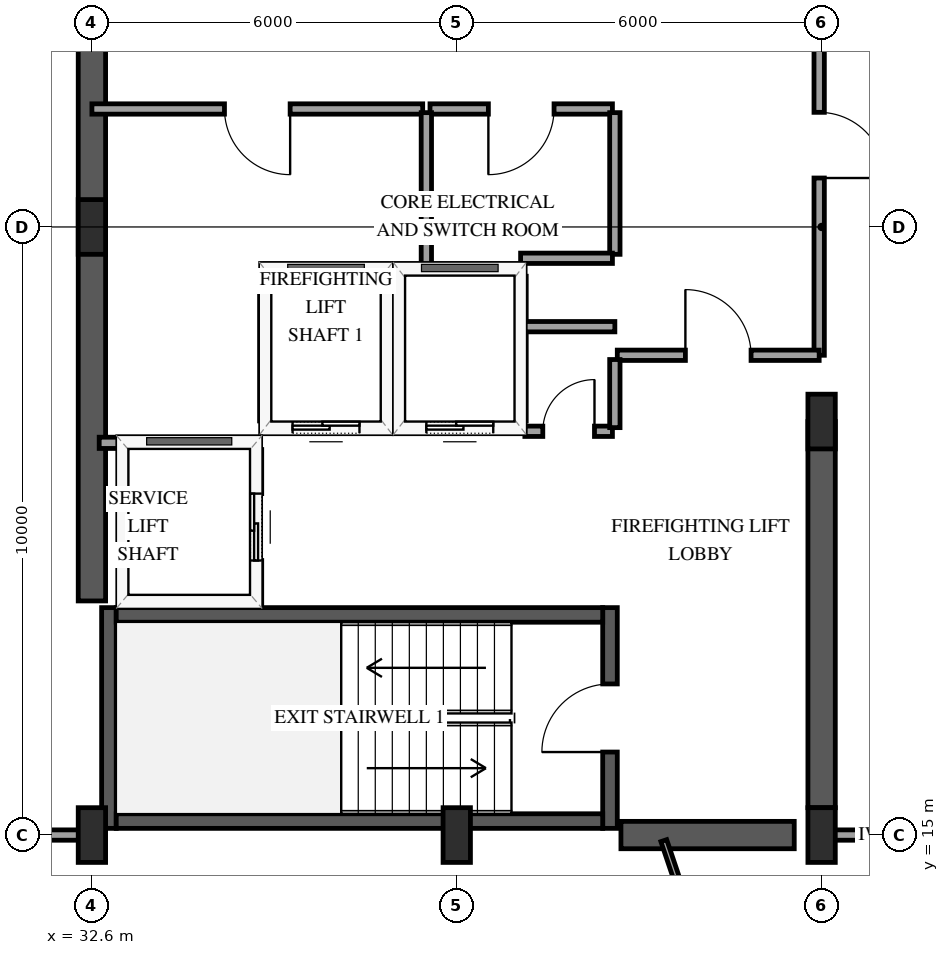
"""IFC4 building model, lengths in metres.
Left out: names, types, materials, properties, quantities, classifications, styles, units other than length and angle.
Written with IfcOpenShell. Run it as: python <this file> out.ifc"""

import sys

from ifc_helpers import new_model, si_unit, direction, frame, frame_2d, origin, origin_2d, place, context, subcontext, project, spatial, rectangle, extrude, element, fill, save


model = new_model("IFC4")
c1 = context("Model", 3, precision=1e-05, world=origin(), true_north=direction((0.0, 1.0)))
c2 = subcontext(c1, "Body", "Model", "MODEL_VIEW")
j1 = project(units=[si_unit("LENGTHUNIT", "METRE"), si_unit("PLANEANGLEUNIT", "RADIAN")], contexts=[c1])
p1 = place(None, origin())
s1 = spatial("IfcSite", under=j1, at=p1, CompositionType="ELEMENT")
p2 = place(p1, origin())
s2 = spatial("IfcBuilding", under=s1, at=p2, CompositionType="ELEMENT")
p3 = place(p2, frame((0.0, 0.0, 280.0)))
s3 = spatial("IfcBuildingStorey", under=s2, at=p3, CompositionType="ELEMENT", Elevation=280.0)
p4 = place(p3, frame((32.88, 15.11, 0.0), z_axis=(0.0, 0.0, 1.0), x_axis=(0.0, 1.0, 0.0)))
e1 = element("IfcWall", 1, at=p4, inside=s3, PredefinedType="SHEAR", context=c2, shape_type="SweptSolid", body=[
    extrude(rectangle(XDim=3.63, YDim=0.24, at=frame_2d((1.815, 0.0))), origin(), (0.0, 0.0, 1.0), 3.75),
])
p5 = place(p3, frame((41.12, 15.11, 0.0), z_axis=(0.0, 0.0, 1.0), x_axis=(0.0, 1.0, 0.0)))
e2 = element("IfcWall", 2, at=p5, inside=s3, PredefinedType="SHEAR", context=c2, shape_type="SweptSolid", body=[
    extrude(rectangle(XDim=3.63, YDim=0.24, at=frame_2d((1.815, 0.0))), origin(), (0.0, 0.0, 1.0), 3.75),
])
p6 = place(p5, frame((1.255, 0.0, 0.0)))
e3 = element("IfcOpeningElement", 3, at=p6, cuts=e2, PredefinedType="OPENING", context=c2, shape_type="SweptSolid", body=[
    extrude(rectangle(XDim=1.12, YDim=2.15, at=frame_2d((0.56, 1.075))), frame((0.0, 0.13, 0.0), z_axis=(0.0, -1.0, 0.0), x_axis=(1.0, 0.0, 0.0)), (0.0, 0.0, 1.0), 0.26),
])
for number, where, z_axis, x_axis in (
    (4, (33.0, 15.23, 0.0), (0.0, 0.0, 1.0), (1.0, 0.0, 0.0)),
    (5, (33.0, 18.62, 0.0), (0.0, 0.0, 1.0), (1.0, 0.0, 0.0)),
):
    element("IfcWall", number, at=place(p3, frame(where, z_axis=z_axis, x_axis=x_axis)), inside=s3, PredefinedType="SHEAR", context=c2, shape_type="SweptSolid", body=[
        extrude(rectangle(XDim=8.0, YDim=0.24, at=frame_2d((4.0, 0.0))), origin(), (0.0, 0.0, 1.0), 3.75),
    ])
p7 = place(p3, frame((32.6, 18.85, 0.0), z_axis=(0.0, 0.0, 1.0), x_axis=(0.0, 1.0, 0.0)))
e6 = element("IfcWall", 6, at=p7, inside=s3, PredefinedType="SHEAR", context=c2, shape_type="SweptSolid", body=[
    extrude(rectangle(XDim=12.3, YDim=0.45, at=frame_2d((6.15, 0.0))), origin(), (0.0, 0.0, 1.0), 3.75),
])
p8 = place(p3, frame((41.3, 15.0, 0.0), z_axis=(0.0, 0.0, 1.0), x_axis=(1.0, 0.0, 0.0)))
e7 = element("IfcWall", 7, at=p8, inside=s3, PredefinedType="SHEAR", context=c2, shape_type="SweptSolid", body=[
    extrude(rectangle(XDim=2.85, YDim=0.45, at=frame_2d((1.425, 0.0))), origin(), (0.0, 0.0, 1.0), 3.75),
])
p9 = place(p3, frame((44.6, 15.45, 0.0), z_axis=(0.0, 0.0, 1.0), x_axis=(0.0, 1.0, 0.0)))
e8 = element("IfcWall", 8, at=p9, inside=s3, PredefinedType="SHEAR", context=c2, shape_type="SweptSolid", body=[
    extrude(rectangle(XDim=6.35, YDim=0.45, at=frame_2d((3.175, 0.0))), origin(), (0.0, 0.0, 1.0), 3.75),
])
for number, where, z_axis, x_axis in (
    (9, (32.6, 15.0, 0.0), (0.0, 0.0, 1.0), (1.0, 0.0, 0.0)),
    (10, (32.6, 25.0, 0.0), (0.0, 0.0, 1.0), (1.0, 0.0, 0.0)),
    (11, (38.6, 15.0, 0.0), (0.0, 0.0, 1.0), (1.0, 0.0, 0.0)),
    (12, (44.6, 15.0, 0.0), (0.0, 0.0, 1.0), (1.0, 0.0, 0.0)),
    (13, (44.6, 21.8, 0.0), (0.0, 0.0, 1.0), (1.0, 0.0, 0.0)),
):
    element("IfcColumn", number, at=place(p3, frame(where, z_axis=z_axis, x_axis=x_axis)), inside=s3, PredefinedType="PILASTER", context=c2, shape_type="SweptSolid", body=[
        extrude(rectangle(XDim=0.45, YDim=0.9, at=origin_2d()), origin(), (0.0, 0.0, 1.0), 3.75),
    ])
p10 = place(p3, frame((35.45, 21.7, 0.0), z_axis=(0.0, 0.0, 1.0), x_axis=(1.0, 0.0, 0.0)))
e14 = element("IfcWall", 14, at=p10, inside=s3, PredefinedType="SOLIDWALL", context=c2, shape_type="SweptSolid", body=[
    extrude(rectangle(XDim=2.0, YDim=0.185, at=frame_2d((1.0, 0.0))), origin(), (0.0, 0.0, 1.0), 3.41),
])
p11 = place(p10, frame((0.45, 0.0, 0.0)))
e15 = element("IfcOpeningElement", 15, at=p11, cuts=e14, PredefinedType="OPENING", context=c2, shape_type="SweptSolid", body=[
    extrude(rectangle(XDim=1.1, YDim=2.15, at=frame_2d((0.55, 1.075))), frame((0.0, 0.103, 0.0), z_axis=(0.0, -1.0, 0.0), x_axis=(1.0, 0.0, 0.0)), (0.0, 0.0, 1.0), 0.205),
])
p12 = place(p3, frame((35.45, 24.3, 0.0), z_axis=(0.0, 0.0, 1.0), x_axis=(1.0, 0.0, 0.0)))
e16 = element("IfcWall", 16, at=p12, inside=s3, PredefinedType="SOLIDWALL", context=c2, shape_type="SweptSolid", body=[
    extrude(rectangle(XDim=2.0, YDim=0.185, at=frame_2d((1.0, 0.0))), origin(), (0.0, 0.0, 1.0), 3.41),
])
for number, where, z_axis, x_axis in (
    (17, (35.45, 21.81, 0.0), (0.0, 0.0, 1.0), (0.0, 1.0, 0.0)),
    (18, (37.45, 21.81, 0.0), (0.0, 0.0, 1.0), (0.0, 1.0, 0.0)),
):
    element("IfcWall", number, at=place(p3, frame(where, z_axis=z_axis, x_axis=x_axis)), inside=s3, PredefinedType="SOLIDWALL", context=c2, shape_type="SweptSolid", body=[
        extrude(rectangle(XDim=2.38, YDim=0.185, at=frame_2d((1.19, 0.0))), origin(), (0.0, 0.0, 1.0), 3.41),
    ])
p13 = place(p3, frame((37.65, 21.7, 0.0), z_axis=(0.0, 0.0, 1.0), x_axis=(1.0, 0.0, 0.0)))
e19 = element("IfcWall", 19, at=p13, inside=s3, PredefinedType="SOLIDWALL", context=c2, shape_type="SweptSolid", body=[
    extrude(rectangle(XDim=2.0, YDim=0.185, at=frame_2d((1.0, 0.0))), origin(), (0.0, 0.0, 1.0), 3.41),
])
p14 = place(p13, frame((0.45, 0.0, 0.0)))
e20 = element("IfcOpeningElement", 20, at=p14, cuts=e19, PredefinedType="OPENING", context=c2, shape_type="SweptSolid", body=[
    extrude(rectangle(XDim=1.1, YDim=2.15, at=frame_2d((0.55, 1.075))), frame((0.0, 0.103, 0.0), z_axis=(0.0, -1.0, 0.0), x_axis=(1.0, 0.0, 0.0)), (0.0, 0.0, 1.0), 0.205),
])
p15 = place(p3, frame((37.65, 24.3, 0.0), z_axis=(0.0, 0.0, 1.0), x_axis=(1.0, 0.0, 0.0)))
e21 = element("IfcWall", 21, at=p15, inside=s3, PredefinedType="SOLIDWALL", context=c2, shape_type="SweptSolid", body=[
    extrude(rectangle(XDim=2.0, YDim=0.185, at=frame_2d((1.0, 0.0))), origin(), (0.0, 0.0, 1.0), 3.41),
])
p16 = place(p3, frame((39.65, 21.81, 0.0), z_axis=(0.0, 0.0, 1.0), x_axis=(0.0, 1.0, 0.0)))
e22 = element("IfcWall", 22, at=p16, inside=s3, PredefinedType="SOLIDWALL", context=c2, shape_type="SweptSolid", body=[
    extrude(rectangle(XDim=2.38, YDim=0.185, at=frame_2d((1.19, 0.0))), origin(), (0.0, 0.0, 1.0), 3.41),
])
p17 = place(p3, frame((32.72, 21.45, 0.0), z_axis=(0.0, 0.0, 1.0), x_axis=(1.0, 0.0, 0.0)))
e23 = element("IfcWall", 23, at=p17, inside=s3, PredefinedType="SOLIDWALL", context=c2, shape_type="SweptSolid", body=[
    extrude(rectangle(XDim=2.58, YDim=0.185, at=frame_2d((1.29, 0.0))), origin(), (0.0, 0.0, 1.0), 3.41),
])
p18 = place(p3, frame((35.3, 18.79, 0.0), z_axis=(0.0, 0.0, 1.0), x_axis=(0.0, 1.0, 0.0)))
e24 = element("IfcWall", 24, at=p18, inside=s3, PredefinedType="SOLIDWALL", context=c2, shape_type="SweptSolid", body=[
    extrude(rectangle(XDim=2.55, YDim=0.185, at=frame_2d((1.275, 0.0))), origin(), (0.0, 0.0, 1.0), 3.41),
])
p19 = place(p18, frame((0.725, 0.0, 0.0)))
e25 = element("IfcOpeningElement", 25, at=p19, cuts=e24, PredefinedType="OPENING", context=c2, shape_type="SweptSolid", body=[
    extrude(rectangle(XDim=1.1, YDim=2.15, at=frame_2d((0.55, 1.075))), frame((0.0, 0.103, 0.0), z_axis=(0.0, -1.0, 0.0), x_axis=(1.0, 0.0, 0.0)), (0.0, 0.0, 1.0), 0.205),
])
p20 = place(p3, frame((42.005, 14.908, 0.0), z_axis=(0.0, 0.0, 1.0), x_axis=(0.31974079099, -0.947505053589, 0.0)))
e26 = element("IfcWall", 26, at=p20, inside=s3, PredefinedType="PARTITIONING", context=c2, shape_type="SweptSolid", body=[
    extrude(rectangle(XDim=8.251, YDim=0.1, at=frame_2d((4.125, 0.0))), origin(), (0.0, 0.0, 1.0), 2.705),
])
p21 = place(p3, frame((44.56, 29.8, 0.0), z_axis=(0.0, 0.0, 1.0), x_axis=(0.0, -1.0, 0.0)))
e27 = element("IfcWall", 27, at=p21, inside=s3, PredefinedType="PARTITIONING", context=c2, shape_type="SweptSolid", body=[
    extrude(rectangle(XDim=6.91, YDim=0.17, at=frame_2d((3.455, 0.0))), origin(), (0.0, 0.0, 1.0), 2.45),
])
p22 = place(p21, frame((2.915, 0.0, 0.0)))
e28 = element("IfcOpeningElement", 28, at=p22, cuts=e27, PredefinedType="OPENING", context=c2, shape_type="SweptSolid", body=[
    extrude(rectangle(XDim=1.08, YDim=2.15, at=frame_2d((0.54, 1.075))), frame((0.0, 0.095, 0.0), z_axis=(0.0, -1.0, 0.0), x_axis=(1.0, 0.0, 0.0)), (0.0, 0.0, 1.0), 0.19),
])
p23 = place(p3, frame((38.04, 26.94, 0.0), z_axis=(0.0, 0.0, 1.0), x_axis=(-1.0, 0.0, 0.0)))
e29 = element("IfcWall", 29, at=p23, inside=s3, PredefinedType="PARTITIONING", context=c2, shape_type="SweptSolid", body=[
    extrude(rectangle(XDim=5.44, YDim=0.17, at=frame_2d((2.72, 0.0))), origin(), (0.0, 0.0, 1.0), 3.41),
])
p24 = place(p23, frame((2.18, 0.0, 0.0)))
e30 = element("IfcOpeningElement", 30, at=p24, cuts=e29, PredefinedType="OPENING", context=c2, shape_type="SweptSolid", body=[
    extrude(rectangle(XDim=1.08, YDim=2.15, at=frame_2d((0.54, 1.075))), frame((0.0, 0.095, 0.0), z_axis=(0.0, -1.0, 0.0), x_axis=(1.0, 0.0, 0.0)), (0.0, 0.0, 1.0), 0.19),
])
p25 = place(p3, frame((41.24, 22.89, 0.0), z_axis=(0.0, 0.0, 1.0), x_axis=(1.0, 0.0, 0.0)))
e31 = element("IfcWall", 31, at=p25, inside=s3, PredefinedType="PARTITIONING", context=c2, shape_type="SweptSolid", body=[
    extrude(rectangle(XDim=3.32, YDim=0.17, at=frame_2d((1.66, 0.0))), origin(), (0.0, 0.0, 1.0), 3.41),
])
p26 = place(p25, frame((1.12, 0.0, 0.0)))
e32 = element("IfcOpeningElement", 32, at=p26, cuts=e31, PredefinedType="OPENING", context=c2, shape_type="SweptSolid", body=[
    extrude(rectangle(XDim=1.08, YDim=2.15, at=frame_2d((0.54, 1.075))), frame((0.0, 0.095, 0.0), z_axis=(0.0, -1.0, 0.0), x_axis=(1.0, 0.0, 0.0)), (0.0, 0.0, 1.0), 0.19),
])
p27 = place(p3, frame((32.53, 15.0, 0.0), z_axis=(0.0, 0.0, 1.0), x_axis=(-1.0, 0.0, 0.0)))
e33 = element("IfcWall", 33, at=p27, inside=s3, PredefinedType="PARTITIONING", context=c2, shape_type="SweptSolid", body=[
    extrude(rectangle(XDim=3.077, YDim=0.17, at=frame_2d((1.539, 0.0))), origin(), (0.0, 0.0, 1.0), 3.41),
])
p28 = place(p3, frame((41.16, 26.94, 0.0), z_axis=(0.0, 0.0, 1.0), x_axis=(-1.0, 0.0, 0.0)))
e34 = element("IfcWall", 34, at=p28, inside=s3, PredefinedType="PARTITIONING", context=c2, shape_type="SweptSolid", body=[
    extrude(rectangle(XDim=3.0, YDim=0.17, at=frame_2d((1.5, 0.0))), origin(), (0.0, 0.0, 1.0), 3.41),
])
p29 = place(p28, frame((0.96, 0.0, 0.0)))
e35 = element("IfcOpeningElement", 35, at=p29, cuts=e34, PredefinedType="OPENING", context=c2, shape_type="SweptSolid", body=[
    extrude(rectangle(XDim=1.08, YDim=2.15, at=frame_2d((0.54, 1.075))), frame((0.0, 0.095, 0.0), z_axis=(0.0, -1.0, 0.0), x_axis=(1.0, 0.0, 0.0)), (0.0, 0.0, 1.0), 0.19),
])
p30 = place(p3, frame((38.1, 26.88, 0.0), z_axis=(0.0, 0.0, 1.0), x_axis=(0.0, -1.0, 0.0)))
e36 = element("IfcWall", 36, at=p30, inside=s3, PredefinedType="PARTITIONING", context=c2, shape_type="SweptSolid", body=[
    extrude(rectangle(XDim=2.58, YDim=0.17, at=frame_2d((1.29, 0.0))), origin(), (0.0, 0.0, 1.0), 3.41),
])
p31 = place(p3, frame((41.2, 24.55, 0.0), z_axis=(0.0, 0.0, 1.0), x_axis=(0.0, 1.0, 0.0)))
e37 = element("IfcWall", 37, at=p31, inside=s3, PredefinedType="PARTITIONING", context=c2, shape_type="SweptSolid", body=[
    extrude(rectangle(XDim=2.33, YDim=0.17, at=frame_2d((1.165, 0.0))), origin(), (0.0, 0.0, 1.0), 3.41),
])
p32 = place(p3, frame((46.58, 15.0, 0.0), z_axis=(0.0, 0.0, 1.0), x_axis=(-1.0, 0.0, 0.0)))
e38 = element("IfcWall", 38, at=p32, inside=s3, PredefinedType="PARTITIONING", context=c2, shape_type="SweptSolid", body=[
    extrude(rectangle(XDim=1.91, YDim=0.17, at=frame_2d((0.955, 0.0))), origin(), (0.0, 0.0, 1.0), 3.41),
])
p33 = place(p3, frame((39.65, 24.485, 0.0), z_axis=(0.0, 0.0, 1.0), x_axis=(1.0, 0.0, 0.0)))
e39 = element("IfcWall", 39, at=p33, inside=s3, PredefinedType="PARTITIONING", context=c2, shape_type="SweptSolid", body=[
    extrude(rectangle(XDim=1.51, YDim=0.17, at=frame_2d((0.755, 0.0))), origin(), (0.0, 0.0, 1.0), 3.41),
])
p34 = place(p3, frame((39.72, 21.64, 0.0), z_axis=(0.0, 0.0, 1.0), x_axis=(1.0, 0.0, 0.0)))
e40 = element("IfcWall", 40, at=p34, inside=s3, PredefinedType="PARTITIONING", context=c2, shape_type="SweptSolid", body=[
    extrude(rectangle(XDim=1.44, YDim=0.17, at=frame_2d((0.72, 0.0))), origin(), (0.0, 0.0, 1.0), 3.41),
])
p35 = place(p34, frame((0.295, 0.0, 0.0)))
e41 = element("IfcOpeningElement", 41, at=p35, cuts=e40, PredefinedType="OPENING", context=c2, shape_type="SweptSolid", body=[
    extrude(rectangle(XDim=0.85, YDim=2.1, at=frame_2d((0.425, 1.05))), frame((0.0, 0.095, 0.0), z_axis=(0.0, -1.0, 0.0), x_axis=(1.0, 0.0, 0.0)), (0.0, 0.0, 1.0), 0.19),
])
p36 = place(p3, frame((41.2, 21.7, 0.0), z_axis=(0.0, 0.0, 1.0), x_axis=(0.0, 1.0, 0.0)))
e42 = element("IfcWall", 42, at=p36, inside=s3, PredefinedType="PARTITIONING", context=c2, shape_type="SweptSolid", body=[
    extrude(rectangle(XDim=1.12, YDim=0.17, at=frame_2d((0.56, 0.0))), origin(), (0.0, 0.0, 1.0), 3.41),
])
p37 = place(p3, frame((41.2, 23.36, 0.0), z_axis=(0.0, 0.0, 1.0), x_axis=(-1.0, 0.0, 0.0)))
e43 = element("IfcWall", 43, at=p37, inside=s3, PredefinedType="PARTITIONING", context=c2, shape_type="SweptSolid", body=[
    extrude(rectangle(XDim=1.48, YDim=0.17, at=frame_2d((0.74, 0.0))), origin(), (0.0, 0.0, 1.0), 3.41),
])
p38 = place(p11, origin())
e44 = element("IfcDoor", 44, at=p38, inside=s3, OperationType="SLIDING_TO_LEFT", PredefinedType="DOOR", context=c2, shape_type="SweptSolid", body=[
    extrude(rectangle(XDim=1.1, YDim=2.15, at=frame_2d((0.55, 1.075))), frame((0.0, 0.025, 0.0), z_axis=(0.0, -1.0, 0.0), x_axis=(1.0, 0.0, 0.0)), (0.0, 0.0, 1.0), 0.05),
])
fill(e15, e44)
p39 = place(p14, origin())
e45 = element("IfcDoor", 45, at=p39, inside=s3, OperationType="SLIDING_TO_LEFT", PredefinedType="DOOR", context=c2, shape_type="SweptSolid", body=[
    extrude(rectangle(XDim=1.1, YDim=2.15, at=frame_2d((0.55, 1.075))), frame((0.0, 0.025, 0.0), z_axis=(0.0, -1.0, 0.0), x_axis=(1.0, 0.0, 0.0)), (0.0, 0.0, 1.0), 0.05),
])
fill(e20, e45)
p40 = place(p19, origin())
e46 = element("IfcDoor", 46, at=p40, inside=s3, OperationType="SLIDING_TO_LEFT", PredefinedType="DOOR", context=c2, shape_type="SweptSolid", body=[
    extrude(rectangle(XDim=1.1, YDim=2.15, at=frame_2d((0.55, 1.075))), frame((0.0, 0.025, 0.0), z_axis=(0.0, -1.0, 0.0), x_axis=(1.0, 0.0, 0.0)), (0.0, 0.0, 1.0), 0.05),
])
fill(e25, e46)
p41 = place(p6, origin())
e47 = element("IfcDoor", 47, at=p41, inside=s3, OperationType="SINGLE_SWING_LEFT", PredefinedType="DOOR", context=c2, shape_type="SweptSolid", body=[
    extrude(rectangle(XDim=1.12, YDim=2.15, at=frame_2d((0.56, 1.075))), frame((0.0, 0.025, 0.0), z_axis=(0.0, -1.0, 0.0), x_axis=(1.0, 0.0, 0.0)), (0.0, 0.0, 1.0), 0.05),
])
fill(e3, e47)
p42 = place(p22, origin())
e48 = element("IfcDoor", 48, at=p42, inside=s3, OperationType="SINGLE_SWING_RIGHT", PredefinedType="DOOR", context=c2, shape_type="SweptSolid", body=[
    extrude(rectangle(XDim=1.08, YDim=2.15, at=frame_2d((0.54, 1.075))), frame((0.0, 0.025, 0.0), z_axis=(0.0, -1.0, 0.0), x_axis=(1.0, 0.0, 0.0)), (0.0, 0.0, 1.0), 0.05),
])
fill(e28, e48)
p43 = place(p24, origin())
e49 = element("IfcDoor", 49, at=p43, inside=s3, OperationType="SINGLE_SWING_LEFT", PredefinedType="DOOR", context=c2, shape_type="SweptSolid", body=[
    extrude(rectangle(XDim=1.08, YDim=2.15, at=frame_2d((0.54, 1.075))), frame((0.0, 0.025, 0.0), z_axis=(0.0, -1.0, 0.0), x_axis=(1.0, 0.0, 0.0)), (0.0, 0.0, 1.0), 0.05),
])
fill(e30, e49)
p44 = place(p26, origin())
e50 = element("IfcDoor", 50, at=p44, inside=s3, OperationType="SINGLE_SWING_LEFT", PredefinedType="DOOR", context=c2, shape_type="SweptSolid", body=[
    extrude(rectangle(XDim=1.08, YDim=2.15, at=frame_2d((0.54, 1.075))), frame((0.0, 0.025, 0.0), z_axis=(0.0, -1.0, 0.0), x_axis=(1.0, 0.0, 0.0)), (0.0, 0.0, 1.0), 0.05),
])
fill(e32, e50)
p45 = place(p29, origin())
e51 = element("IfcDoor", 51, at=p45, inside=s3, OperationType="SINGLE_SWING_RIGHT", PredefinedType="DOOR", context=c2, shape_type="SweptSolid", body=[
    extrude(rectangle(XDim=1.08, YDim=2.15, at=frame_2d((0.54, 1.075))), frame((0.0, 0.025, 0.0), z_axis=(0.0, -1.0, 0.0), x_axis=(1.0, 0.0, 0.0)), (0.0, 0.0, 1.0), 0.05),
])
fill(e35, e51)
p46 = place(p35, origin())
e52 = element("IfcDoor", 52, at=p46, inside=s3, OperationType="SINGLE_SWING_RIGHT", PredefinedType="DOOR", context=c2, shape_type="SweptSolid", body=[
    extrude(rectangle(XDim=0.85, YDim=2.1, at=frame_2d((0.425, 1.05))), frame((0.0, 0.025, 0.0), z_axis=(0.0, -1.0, 0.0), x_axis=(1.0, 0.0, 0.0)), (0.0, 0.0, 1.0), 0.05),
])
fill(e41, e52)
save(model, sys.argv[1])
